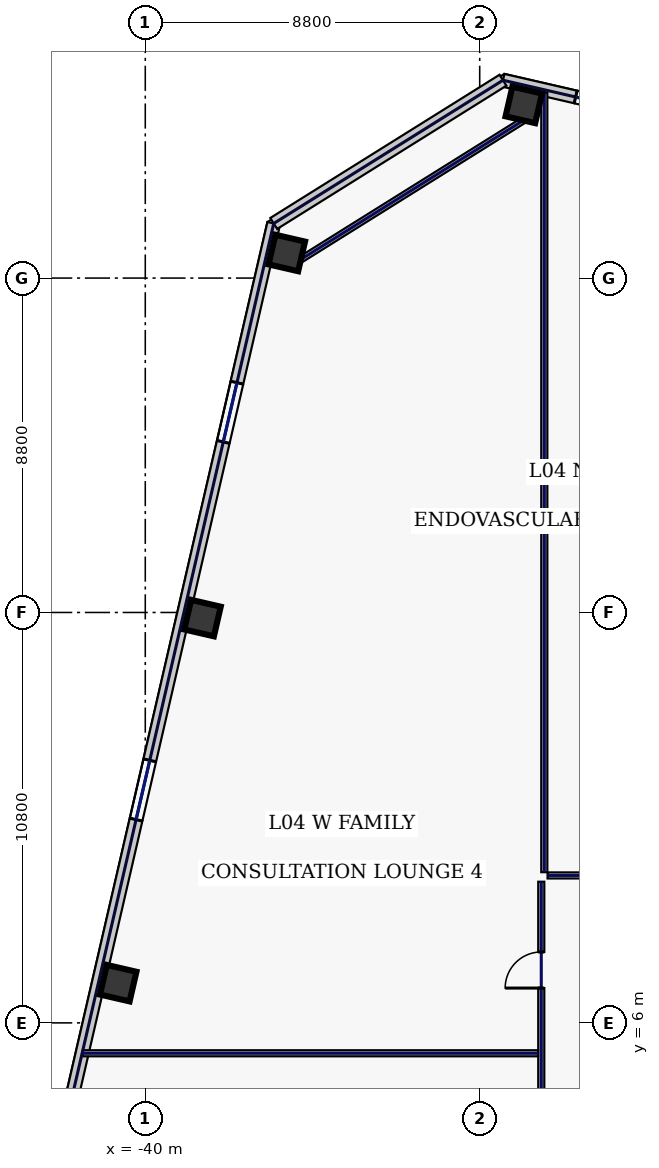
"""IFC4 building model, lengths in metres.
Left out: names, types, materials, properties, quantities, classifications, styles, units other than length and angle.
Written with IfcOpenShell. Run it as: python <this file> out.ifc"""

import sys

from ifc_helpers import new_model, si_unit, direction, frame, frame_2d, origin, origin_2d, place, context, subcontext, project, spatial, rectangle, hollow_rectangle, extrude, element, fill, save


model = new_model("IFC4")
c1 = context("Model", 3, precision=1e-05, world=origin(), true_north=direction((0.0, 1.0)))
c2 = subcontext(c1, "Body", "Model", "MODEL_VIEW")
j1 = project(units=[si_unit("LENGTHUNIT", "METRE"), si_unit("PLANEANGLEUNIT", "RADIAN")], contexts=[c1])
p1 = place(None, origin())
s1 = spatial("IfcSite", under=j1, at=p1, CompositionType="ELEMENT")
p2 = place(p1, origin())
s2 = spatial("IfcBuilding", under=s1, at=p2, CompositionType="ELEMENT")
p3 = place(p2, frame((0.0, 0.0, 23.4)))
s3 = spatial("IfcBuildingStorey", under=s2, at=p3, CompositionType="ELEMENT", Elevation=23.4)
for number, where, z_axis, x_axis in (
    (1, (-30.04, 30.156, 0.0), (0.0, 0.0, 1.0), (0.974, -0.225, 0.0)),
    (2, (-36.276, 26.26, 0.0), (0.0, 0.0, 1.0), (0.974, -0.225, 0.0)),
    (3, (-38.494, 16.652, 0.0), (0.0, 0.0, 1.0), (0.974, -0.225, 0.0)),
    (4, (-40.712, 7.045, 0.0), (0.0, 0.0, 1.0), (0.974, -0.225, 0.0)),
):
    element("IfcColumn", number, at=place(p3, frame(where, z_axis=z_axis, x_axis=x_axis)), inside=s3, PredefinedType="COLUMN", context=c2, shape_type="SweptSolid", body=[
        extrude(hollow_rectangle(XDim=0.8, YDim=0.8, WallThickness=0.036, at=origin_2d()), origin(), (0.0, 0.0, 1.0), 4.7),
    ])
p4 = place(p3, frame((-8.517, 25.711, 0.0), z_axis=(0.0, 0.0, 1.0), x_axis=(-0.974372845456, 0.224939009598, 0.0)))
e5 = element("IfcWall", 5, at=p4, inside=s3, PredefinedType="STANDARD", context=c2, shape_type="SweptSolid", body=[
    extrude(rectangle(XDim=22.652, YDim=0.34, at=frame_2d((11.326, 0.0))), origin(), (0.0, 0.0, 1.0), 4.7),
])
p5 = place(p4, frame((17.989, 0.0, 0.9)))
e6 = element("IfcOpeningElement", 6, at=p5, cuts=e5, PredefinedType="OPENING", context=c2, shape_type="SweptSolid", body=[
    extrude(rectangle(XDim=2.7, YDim=2.2, at=frame_2d((1.35, 1.1))), frame((0.0, 0.18, 0.0), z_axis=(0.0, -1.0, 0.0), x_axis=(1.0, 0.0, 0.0)), (0.0, 0.0, 1.0), 0.36),
])
p6 = place(p4, frame((14.055, 0.0, 0.22)))
e7 = element("IfcOpeningElement", 7, at=p6, cuts=e5, PredefinedType="OPENING", context=c2, shape_type="SweptSolid", body=[
    extrude(rectangle(XDim=1.6, YDim=1.2, at=frame_2d((0.8, 0.6))), frame((0.0, 0.18, 0.0), z_axis=(0.0, -1.0, 0.0), x_axis=(1.0, 0.0, 0.0)), (0.0, 0.0, 1.0), 0.36),
])
p7 = place(p4, frame((8.241, 0.0, 0.9)))
e8 = element("IfcOpeningElement", 8, at=p7, cuts=e5, PredefinedType="OPENING", context=c2, shape_type="SweptSolid", body=[
    extrude(rectangle(XDim=0.85, YDim=1.85, at=frame_2d((0.425, 0.925))), frame((0.0, 0.18, 0.0), z_axis=(0.0, -1.0, 0.0), x_axis=(1.0, 0.0, 0.0)), (0.0, 0.0, 1.0), 0.36),
])
p8 = place(p4, frame((3.756, 0.0, 0.9)))
e9 = element("IfcOpeningElement", 9, at=p8, cuts=e5, PredefinedType="OPENING", context=c2, shape_type="SweptSolid", body=[
    extrude(rectangle(XDim=2.7, YDim=2.2, at=frame_2d((1.35, 1.1))), frame((0.0, 0.18, 0.0), z_axis=(0.0, -1.0, 0.0), x_axis=(1.0, 0.0, 0.0)), (0.0, 0.0, 1.0), 0.36),
])
p9 = place(p3, frame((-36.62, 27.037, 0.0), z_axis=(0.0, 0.0, 1.0), x_axis=(-0.224951280646, -0.974370012539, 0.0)))
e10 = element("IfcWall", 10, at=p9, inside=s3, PredefinedType="STANDARD", context=c2, shape_type="SweptSolid", body=[
    extrude(rectangle(XDim=40.8, YDim=0.34, at=frame_2d((20.4, 0.0))), origin(), (0.0, 0.0, 1.0), 4.7),
])
p10 = place(p9, frame((4.3, 0.0, 0.58)))
e11 = element("IfcOpeningElement", 11, at=p10, cuts=e10, PredefinedType="OPENING", context=c2, shape_type="SweptSolid", body=[
    extrude(rectangle(XDim=1.6, YDim=2.3, at=frame_2d((0.8, 1.15))), frame((0.0, 0.18, 0.0), z_axis=(0.0, -1.0, 0.0), x_axis=(1.0, 0.0, 0.0)), (0.0, 0.0, 1.0), 0.36),
])
p11 = place(p9, frame((14.5, 0.0, 0.58)))
e12 = element("IfcOpeningElement", 12, at=p11, cuts=e10, PredefinedType="OPENING", context=c2, shape_type="SweptSolid", body=[
    extrude(rectangle(XDim=1.6, YDim=2.3, at=frame_2d((0.8, 1.15))), frame((0.0, 0.18, 0.0), z_axis=(0.0, -1.0, 0.0), x_axis=(1.0, 0.0, 0.0)), (0.0, 0.0, 1.0), 0.36),
])
p12 = place(p9, frame((24.7, 0.0, 0.58)))
e13 = element("IfcOpeningElement", 13, at=p12, cuts=e10, PredefinedType="OPENING", context=c2, shape_type="SweptSolid", body=[
    extrude(rectangle(XDim=1.6, YDim=2.3, at=frame_2d((0.8, 1.15))), frame((0.0, 0.18, 0.0), z_axis=(0.0, -1.0, 0.0), x_axis=(1.0, 0.0, 0.0)), (0.0, 0.0, 1.0), 0.36),
])
p13 = place(p9, frame((34.9, 0.0, 0.58)))
e14 = element("IfcOpeningElement", 14, at=p13, cuts=e10, PredefinedType="OPENING", context=c2, shape_type="SweptSolid", body=[
    extrude(rectangle(XDim=1.6, YDim=2.3, at=frame_2d((0.8, 1.15))), frame((0.0, 0.18, 0.0), z_axis=(0.0, -1.0, 0.0), x_axis=(1.0, 0.0, 0.0)), (0.0, 0.0, 1.0), 0.36),
])
p14 = place(p3, frame((-30.588, 30.807, 0.0), z_axis=(0.0, 0.0, 1.0), x_axis=(-0.848031080615, -0.529946493819, 0.0)))
e15 = element("IfcWall", 15, at=p14, inside=s3, PredefinedType="STANDARD", context=c2, shape_type="SweptSolid", body=[
    extrude(rectangle(XDim=7.114, YDim=0.34, at=frame_2d((3.557, 0.0))), origin(), (0.0, 0.0, 1.0), 4.7),
])
p15 = place(p3, frame((-29.86, 29.868, 0.0), z_axis=(0.0, 0.0, 1.0), x_axis=(-0.848043064089, -0.529927317139, 0.0)))
e16 = element("IfcWall", 16, at=p15, inside=s3, PredefinedType="PARTITIONING", context=c2, shape_type="SweptSolid", body=[
    extrude(rectangle(XDim=7.354, YDim=0.16, at=frame_2d((3.677, 0.0))), origin(), (0.0, 0.0, 1.0), 4.7),
])
p16 = place(p3, frame((-29.58, -9.715, 0.0), z_axis=(0.0, 0.0, 1.0), x_axis=(0.0, 1.0, 0.0)))
e17 = element("IfcWall", 17, at=p16, inside=s3, PredefinedType="PARTITIONING", context=c2, shape_type="SweptSolid", body=[
    extrude(rectangle(XDim=19.43, YDim=0.16, at=frame_2d((9.715, 0.0))), origin(), (0.0, 0.0, 1.0), 4.7),
])
p17 = place(p16, frame((2.019, 0.0, 0.0)))
e18 = element("IfcOpeningElement", 18, at=p17, cuts=e17, PredefinedType="OPENING", context=c2, shape_type="SweptSolid", body=[
    extrude(rectangle(XDim=0.95, YDim=2.2, at=frame_2d((0.475, 1.1))), frame((0.0, 0.09, 0.0), z_axis=(0.0, -1.0, 0.0), x_axis=(1.0, 0.0, 0.0)), (0.0, 0.0, 1.0), 0.18),
])
p18 = place(p16, frame((6.725, 0.0, 0.0)))
e19 = element("IfcOpeningElement", 19, at=p18, cuts=e17, PredefinedType="OPENING", context=c2, shape_type="SweptSolid", body=[
    extrude(rectangle(XDim=0.95, YDim=2.2, at=frame_2d((0.475, 1.1))), frame((0.0, 0.09, 0.0), z_axis=(0.0, -1.0, 0.0), x_axis=(1.0, 0.0, 0.0)), (0.0, 0.0, 1.0), 0.18),
])
p19 = place(p16, frame((11.925, 0.0, 0.0)))
e20 = element("IfcOpeningElement", 20, at=p19, cuts=e17, PredefinedType="OPENING", context=c2, shape_type="SweptSolid", body=[
    extrude(rectangle(XDim=0.95, YDim=2.2, at=frame_2d((0.475, 1.1))), frame((0.0, 0.09, 0.0), z_axis=(0.0, -1.0, 0.0), x_axis=(1.0, 0.0, 0.0)), (0.0, 0.0, 1.0), 0.18),
])
p20 = place(p16, frame((16.631, 0.0, 0.0)))
e21 = element("IfcOpeningElement", 21, at=p20, cuts=e17, PredefinedType="OPENING", context=c2, shape_type="SweptSolid", body=[
    extrude(rectangle(XDim=0.95, YDim=2.2, at=frame_2d((0.475, 1.1))), frame((0.0, 0.09, 0.0), z_axis=(0.0, -1.0, 0.0), x_axis=(1.0, 0.0, 0.0)), (0.0, 0.0, 1.0), 0.18),
])
p21 = place(p3, frame((-29.415, 9.88, 0.0), z_axis=(0.0, 0.0, 1.0), x_axis=(1.0, 0.0, 0.0)))
e22 = element("IfcWall", 22, at=p21, inside=s3, PredefinedType="PARTITIONING", context=c2, shape_type="SweptSolid", body=[
    extrude(rectangle(XDim=58.83, YDim=0.16, at=frame_2d((29.415, 0.0))), origin(), (0.0, 0.0, 1.0), 4.7),
])
p22 = place(p21, frame((2.044, 0.0, 0.0)))
e23 = element("IfcOpeningElement", 23, at=p22, cuts=e22, PredefinedType="OPENING", context=c2, shape_type="SweptSolid", body=[
    extrude(rectangle(XDim=0.95, YDim=2.2, at=frame_2d((0.475, 1.1))), frame((0.0, 0.09, 0.0), z_axis=(0.0, -1.0, 0.0), x_axis=(1.0, 0.0, 0.0)), (0.0, 0.0, 1.0), 0.18),
])
p23 = place(p21, frame((7.5, 0.0, 0.0)))
e24 = element("IfcOpeningElement", 24, at=p23, cuts=e22, PredefinedType="OPENING", context=c2, shape_type="SweptSolid", body=[
    extrude(rectangle(XDim=0.95, YDim=2.2, at=frame_2d((0.475, 1.1))), frame((0.0, 0.09, 0.0), z_axis=(0.0, -1.0, 0.0), x_axis=(1.0, 0.0, 0.0)), (0.0, 0.0, 1.0), 0.18),
])
p24 = place(p21, frame((14.725, 0.0, 0.0)))
e25 = element("IfcOpeningElement", 25, at=p24, cuts=e22, PredefinedType="OPENING", context=c2, shape_type="SweptSolid", body=[
    extrude(rectangle(XDim=0.95, YDim=2.2, at=frame_2d((0.475, 1.1))), frame((0.0, 0.09, 0.0), z_axis=(0.0, -1.0, 0.0), x_axis=(1.0, 0.0, 0.0)), (0.0, 0.0, 1.0), 0.18),
])
p25 = place(p21, frame((23.025, 0.0, 0.0)))
e26 = element("IfcOpeningElement", 26, at=p25, cuts=e22, PredefinedType="OPENING", context=c2, shape_type="SweptSolid", body=[
    extrude(rectangle(XDim=0.95, YDim=2.2, at=frame_2d((0.475, 1.1))), frame((0.0, 0.09, 0.0), z_axis=(0.0, -1.0, 0.0), x_axis=(1.0, 0.0, 0.0)), (0.0, 0.0, 1.0), 0.18),
])
p26 = place(p21, frame((32.125, 0.0, 0.0)))
e27 = element("IfcOpeningElement", 27, at=p26, cuts=e22, PredefinedType="OPENING", context=c2, shape_type="SweptSolid", body=[
    extrude(rectangle(XDim=0.95, YDim=2.2, at=frame_2d((0.475, 1.1))), frame((0.0, 0.09, 0.0), z_axis=(0.0, -1.0, 0.0), x_axis=(1.0, 0.0, 0.0)), (0.0, 0.0, 1.0), 0.18),
])
p27 = place(p21, frame((41.025, 0.0, 0.0)))
e28 = element("IfcOpeningElement", 28, at=p27, cuts=e22, PredefinedType="OPENING", context=c2, shape_type="SweptSolid", body=[
    extrude(rectangle(XDim=0.95, YDim=2.2, at=frame_2d((0.475, 1.1))), frame((0.0, 0.09, 0.0), z_axis=(0.0, -1.0, 0.0), x_axis=(1.0, 0.0, 0.0)), (0.0, 0.0, 1.0), 0.18),
])
p28 = place(p21, frame((48.825, 0.0, 0.0)))
e29 = element("IfcOpeningElement", 29, at=p28, cuts=e22, PredefinedType="OPENING", context=c2, shape_type="SweptSolid", body=[
    extrude(rectangle(XDim=0.95, YDim=2.2, at=frame_2d((0.475, 1.1))), frame((0.0, 0.09, 0.0), z_axis=(0.0, -1.0, 0.0), x_axis=(1.0, 0.0, 0.0)), (0.0, 0.0, 1.0), 0.18),
])
p29 = place(p21, frame((55.281, 0.0, 0.0)))
e30 = element("IfcOpeningElement", 30, at=p29, cuts=e22, PredefinedType="OPENING", context=c2, shape_type="SweptSolid", body=[
    extrude(rectangle(XDim=0.95, YDim=2.2, at=frame_2d((0.475, 1.1))), frame((0.0, 0.09, 0.0), z_axis=(0.0, -1.0, 0.0), x_axis=(1.0, 0.0, 0.0)), (0.0, 0.0, 1.0), 0.18),
])
p30 = place(p3, frame((-29.5, 9.965, 0.0), z_axis=(0.0, 0.0, 1.0), x_axis=(0.0, 1.0, 0.0)))
e31 = element("IfcWall", 31, at=p30, inside=s3, PredefinedType="PARTITIONING", context=c2, shape_type="SweptSolid", body=[
    extrude(rectangle(XDim=20.519, YDim=0.16, at=frame_2d((10.259, 0.0))), origin(), (0.0, 0.0, 1.0), 4.7),
])
p31 = place(p3, frame((-41.641, 5.2, 0.0), z_axis=(0.0, 0.0, 1.0), x_axis=(1.0, 0.0, 0.0)))
e32 = element("IfcWall", 32, at=p31, inside=s3, PredefinedType="PARTITIONING", context=c2, shape_type="SweptSolid", body=[
    extrude(rectangle(XDim=11.976, YDim=0.16, at=frame_2d((5.988, 0.0))), origin(), (0.0, 0.0, 1.0), 4.7),
])
p32 = place(p5, origin())
e33 = element("IfcWindow", 33, at=p32, inside=s3, PartitioningType="SINGLE_PANEL", PredefinedType="WINDOW", context=c2, shape_type="SweptSolid", body=[
    extrude(rectangle(XDim=2.7, YDim=2.2, at=frame_2d((1.35, 1.1))), frame((0.0, 0.03, 0.0), z_axis=(0.0, -1.0, 0.0), x_axis=(1.0, 0.0, 0.0)), (0.0, 0.0, 1.0), 0.06),
])
fill(e6, e33)
p33 = place(p10, origin())
e34 = element("IfcWindow", 34, at=p33, inside=s3, PartitioningType="SINGLE_PANEL", PredefinedType="WINDOW", context=c2, shape_type="SweptSolid", body=[
    extrude(rectangle(XDim=1.6, YDim=2.3, at=frame_2d((0.8, 1.15))), frame((0.0, 0.03, 0.0), z_axis=(0.0, -1.0, 0.0), x_axis=(1.0, 0.0, 0.0)), (0.0, 0.0, 1.0), 0.06),
])
fill(e11, e34)
p34 = place(p11, origin())
e35 = element("IfcWindow", 35, at=p34, inside=s3, PartitioningType="SINGLE_PANEL", PredefinedType="WINDOW", context=c2, shape_type="SweptSolid", body=[
    extrude(rectangle(XDim=1.6, YDim=2.3, at=frame_2d((0.8, 1.15))), frame((0.0, 0.03, 0.0), z_axis=(0.0, -1.0, 0.0), x_axis=(1.0, 0.0, 0.0)), (0.0, 0.0, 1.0), 0.06),
])
fill(e12, e35)
p35 = place(p20, origin())
e36 = element("IfcDoor", 36, at=p35, inside=s3, OperationType="SINGLE_SWING_LEFT", PredefinedType="DOOR", context=c2, shape_type="SweptSolid", body=[
    extrude(rectangle(XDim=0.95, YDim=2.2, at=frame_2d((0.475, 1.1))), frame((0.0, 0.025, 0.0), z_axis=(0.0, -1.0, 0.0), x_axis=(1.0, 0.0, 0.0)), (0.0, 0.0, 1.0), 0.05),
])
fill(e21, e36)
save(model, sys.argv[1])
